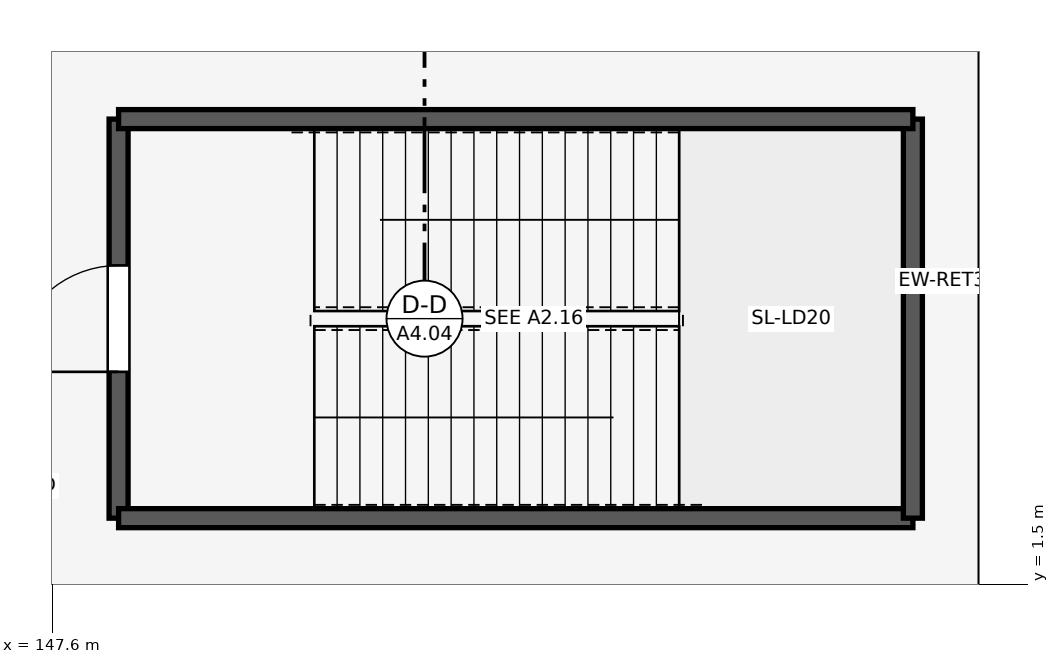
"""IFC4 building model, lengths in metres.
Left out: names, types, materials, properties, quantities, classifications, styles, units other than length and angle.
Written with IfcOpenShell. Run it as: python <this file> out.ifc"""

import sys

from ifc_helpers import new_model, si_unit, direction, frame, frame_2d, origin, place, context, subcontext, project, spatial, rectangle, extrude, element, fill, save


model = new_model("IFC4")
c1 = context("Model", 3, precision=1e-05, world=origin(), true_north=direction((0.0, 1.0)))
c2 = subcontext(c1, "Body", "Model", "MODEL_VIEW")
j1 = project(units=[si_unit("LENGTHUNIT", "METRE"), si_unit("PLANEANGLEUNIT", "RADIAN")], contexts=[c1])
p1 = place(None, origin())
s1 = spatial("IfcSite", under=j1, at=p1, CompositionType="ELEMENT")
p2 = place(p1, origin())
s2 = spatial("IfcBuilding", under=s1, at=p2, CompositionType="ELEMENT")
p3 = place(p2, frame((0.0, 0.0, -5.4)))
s3 = spatial("IfcBuildingStorey", under=s2, at=p3, CompositionType="ELEMENT", Elevation=-5.4)
p4 = place(p3, frame((148.475, 7.625, 0.0), z_axis=(0.0, 0.0, 1.0), x_axis=(0.0, -1.0, 0.0)))
e1 = element("IfcWall", 1, at=p4, inside=s3, PredefinedType="SHEAR", context=c2, shape_type="SweptSolid", body=[
    extrude(rectangle(XDim=5.25, YDim=0.25, at=frame_2d((2.625, 0.0))), origin(), (0.0, 0.0, 1.0), 5.05),
])
p5 = place(p4, frame((1.925, 0.0, 0.0)))
e2 = element("IfcOpeningElement", 2, at=p5, cuts=e1, PredefinedType="OPENING", context=c2, shape_type="SweptSolid", body=[
    extrude(rectangle(XDim=1.4, YDim=2.2, at=frame_2d((0.7, 1.1))), frame((0.0, 0.135, 0.0), z_axis=(0.0, -1.0, 0.0), x_axis=(1.0, 0.0, 0.0)), (0.0, 0.0, 1.0), 0.27),
])
p6 = place(p3, frame((148.475, 2.375, 0.0), z_axis=(0.0, 0.0, 1.0), x_axis=(1.0, 0.0, 0.0)))
e3 = element("IfcWall", 3, at=p6, inside=s3, PredefinedType="SHEAR", context=c2, shape_type="SweptSolid", body=[
    extrude(rectangle(XDim=10.45, YDim=0.25, at=frame_2d((5.225, 0.0))), origin(), (0.0, 0.0, 1.0), 5.05),
])
p7 = place(p3, frame((158.925, 2.375, 0.0), z_axis=(0.0, 0.0, 1.0), x_axis=(0.0, 1.0, 0.0)))
e4 = element("IfcWall", 4, at=p7, inside=s3, PredefinedType="SHEAR", context=c2, shape_type="SweptSolid", body=[
    extrude(rectangle(XDim=5.25, YDim=0.25, at=frame_2d((2.625, 0.0))), origin(), (0.0, 0.0, 1.0), 5.05),
])
p8 = place(p3, frame((158.925, 7.625, 0.0), z_axis=(0.0, 0.0, 1.0), x_axis=(-1.0, 0.0, 0.0)))
e5 = element("IfcWall", 5, at=p8, inside=s3, PredefinedType="SHEAR", context=c2, shape_type="SweptSolid", body=[
    extrude(rectangle(XDim=10.45, YDim=0.25, at=frame_2d((5.225, 0.0))), origin(), (0.0, 0.0, 1.0), 5.05),
])
p9 = place(p5, frame((1.4, 0.0, 0.0), z_axis=(0.0, 0.0, 1.0), x_axis=(-1.0, 0.0, 0.0)))
e6 = element("IfcDoor", 6, at=p9, inside=s3, OperationType="SINGLE_SWING_LEFT", PredefinedType="DOOR", context=c2, shape_type="SweptSolid", body=[
    extrude(rectangle(XDim=1.4, YDim=2.2, at=frame_2d((0.7, 1.1))), frame((0.0, 0.025, 0.0), z_axis=(0.0, -1.0, 0.0), x_axis=(1.0, 0.0, 0.0)), (0.0, 0.0, 1.0), 0.05),
])
fill(e2, e6)
save(model, sys.argv[1])
